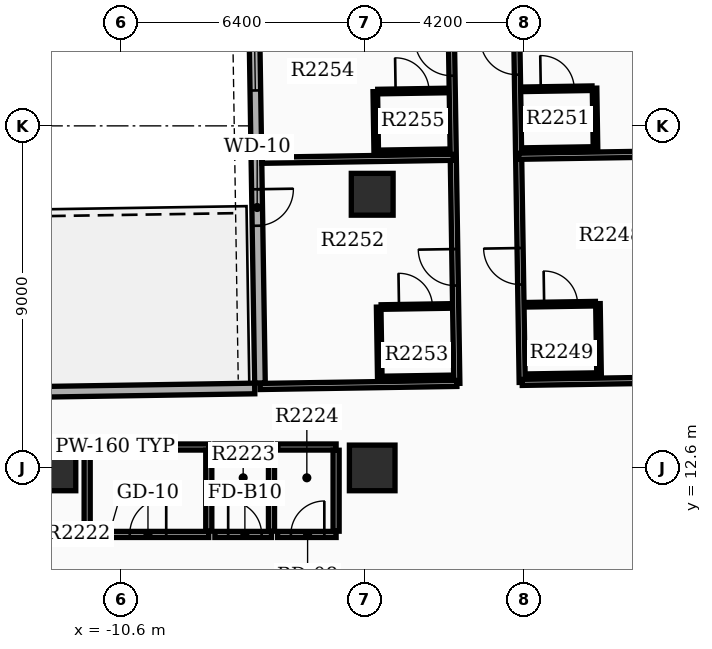
"""IFC4 building model, lengths in metres.
Left out: names, types, materials, properties, quantities, classifications, styles, units other than length and angle.
Written with IfcOpenShell. Run it as: python <this file> out.ifc"""

import sys

from ifc_helpers import new_model, si_unit, direction, frame, frame_2d, origin, origin_2d, place, context, subcontext, project, spatial, rectangle, extrude, element, fill, save


model = new_model("IFC4")
c1 = context("Model", 3, precision=1e-05, world=origin(), true_north=direction((0.0, 1.0)))
c2 = subcontext(c1, "Body", "Model", "MODEL_VIEW")
j1 = project(units=[si_unit("LENGTHUNIT", "METRE"), si_unit("PLANEANGLEUNIT", "RADIAN")], contexts=[c1])
p1 = place(None, origin())
s1 = spatial("IfcSite", under=j1, at=p1, CompositionType="ELEMENT")
p2 = place(p1, origin())
s2 = spatial("IfcBuilding", under=s1, at=p2, CompositionType="ELEMENT")
p3 = place(p2, frame((0.0, 0.0, 139.8)))
s3 = spatial("IfcBuildingStorey", under=s2, at=p3, CompositionType="ELEMENT", Elevation=139.8)
for number, where, z_axis, x_axis in (
    (1, (-12.4, 12.6, 0.0), (0.0, 0.0, 1.0), (1.0, 0.0, 0.0)),
    (2, (-4.0, 12.6, 0.0), (0.0, 0.0, 1.0), (1.0, 0.0, 0.0)),
):
    element("IfcColumn", number, at=place(p3, frame(where, z_axis=z_axis, x_axis=x_axis)), inside=s3, PredefinedType="COLUMN", context=c2, shape_type="SweptSolid", body=[
        extrude(rectangle(XDim=1.2, YDim=1.2, at=origin_2d()), origin(), (0.0, 0.0, 1.0), 3.9),
    ])
p4 = place(p3, frame((-4.0, 19.8, 0.0), z_axis=(0.0, 0.0, 1.0), x_axis=(1.0, 0.0, 0.0)))
e3 = element("IfcColumn", 3, at=p4, inside=s3, PredefinedType="COLUMN", context=c2, shape_type="SweptSolid", body=[
    extrude(rectangle(XDim=1.1, YDim=1.1, at=origin_2d()), origin(), (0.0, 0.0, 1.0), 3.9),
])
p5 = place(p3, frame((-7.27, 34.93, 0.0), z_axis=(0.0, 0.0, 1.0), x_axis=(0.015705059908, -0.999876667941, 0.0)))
e4 = element("IfcWall", 4, at=p5, inside=s3, PredefinedType="STANDARD", context=c2, shape_type="SweptSolid", body=[
    extrude(rectangle(XDim=20.1, YDim=0.28, at=frame_2d((10.05, 0.0))), origin(), (0.0, 0.0, 1.0), 2.92),
])
p6 = place(p5, frame((1.6, 0.0, 0.8)))
e5 = element("IfcOpeningElement", 5, at=p6, cuts=e4, PredefinedType="OPENING", context=c2, shape_type="SweptSolid", body=[
    extrude(rectangle(XDim=1.2, YDim=1.6, at=frame_2d((0.6, 0.8))), frame((0.0, 0.15, 0.0), z_axis=(0.0, -1.0, 0.0), x_axis=(1.0, 0.0, 0.0)), (0.0, 0.0, 1.0), 0.3),
])
p7 = place(p5, frame((4.8, 0.0, 0.8)))
e6 = element("IfcOpeningElement", 6, at=p7, cuts=e4, PredefinedType="OPENING", context=c2, shape_type="SweptSolid", body=[
    extrude(rectangle(XDim=1.2, YDim=1.6, at=frame_2d((0.6, 0.8))), frame((0.0, 0.15, 0.0), z_axis=(0.0, -1.0, 0.0), x_axis=(1.0, 0.0, 0.0)), (0.0, 0.0, 1.0), 0.3),
])
p8 = place(p5, frame((8.0, 0.0, 0.8)))
e7 = element("IfcOpeningElement", 7, at=p8, cuts=e4, PredefinedType="OPENING", context=c2, shape_type="SweptSolid", body=[
    extrude(rectangle(XDim=1.2, YDim=1.6, at=frame_2d((0.6, 0.8))), frame((0.0, 0.15, 0.0), z_axis=(0.0, -1.0, 0.0), x_axis=(1.0, 0.0, 0.0)), (0.0, 0.0, 1.0), 0.3),
])
p9 = place(p5, frame((11.2, 0.0, 0.8)))
e8 = element("IfcOpeningElement", 8, at=p9, cuts=e4, PredefinedType="OPENING", context=c2, shape_type="SweptSolid", body=[
    extrude(rectangle(XDim=1.2, YDim=1.6, at=frame_2d((0.6, 0.8))), frame((0.0, 0.15, 0.0), z_axis=(0.0, -1.0, 0.0), x_axis=(1.0, 0.0, 0.0)), (0.0, 0.0, 1.0), 0.3),
])
p10 = place(p5, frame((15.0, 0.0, 0.0)))
e9 = element("IfcOpeningElement", 9, at=p10, cuts=e4, PredefinedType="OPENING", context=c2, shape_type="SweptSolid", body=[
    extrude(rectangle(XDim=0.96, YDim=2.1, at=frame_2d((0.48, 1.05))), frame((0.0, 0.15, 0.0), z_axis=(0.0, -1.0, 0.0), x_axis=(1.0, 0.0, 0.0)), (0.0, 0.0, 1.0), 0.3),
])
p11 = place(p3, frame((-13.391, 14.592, 0.0), z_axis=(0.0, 0.0, 1.0), x_axis=(0.999876833368, 0.015694524359, 0.0)))
e10 = element("IfcWall", 10, at=p11, inside=s3, PredefinedType="STANDARD", context=c2, shape_type="SweptSolid", body=[
    extrude(rectangle(XDim=6.3, YDim=0.28, at=frame_2d((3.15, 0.0))), origin(), (0.0, 0.0, 1.0), 2.92),
])
p12 = place(p3, frame((-11.5, 10.85, 0.0), z_axis=(0.0, 0.0, 1.0), x_axis=(1.0, 0.0, 0.0)))
e11 = element("IfcWall", 11, at=p12, inside=s3, PredefinedType="PARTITIONING", context=c2, shape_type="SweptSolid", body=[
    extrude(rectangle(XDim=3.2, YDim=0.16, at=frame_2d((1.6, 0.0))), origin(), (0.0, 0.0, 1.0), 2.91),
])
p13 = place(p12, frame((1.12, 0.0, 0.0)))
e12 = element("IfcOpeningElement", 12, at=p13, cuts=e11, PredefinedType="OPENING", context=c2, shape_type="SweptSolid", body=[
    extrude(rectangle(XDim=0.96, YDim=2.15, at=frame_2d((0.48, 1.075))), frame((0.0, 0.09, 0.0), z_axis=(0.0, -1.0, 0.0), x_axis=(1.0, 0.0, 0.0)), (0.0, 0.0, 1.0), 0.18),
])
p14 = place(p3, frame((-11.5, 13.15, 0.0), z_axis=(0.0, 0.0, 1.0), x_axis=(1.0, 0.0, 0.0)))
e13 = element("IfcWall", 13, at=p14, inside=s3, PredefinedType="PARTITIONING", context=c2, shape_type="SweptSolid", body=[
    extrude(rectangle(XDim=3.2, YDim=0.16, at=frame_2d((1.6, 0.0))), origin(), (0.0, 0.0, 1.0), 2.91),
])
for number, where, z_axis, x_axis in (
    (14, (-11.5, 10.935, 0.0), (0.0, 0.0, 1.0), (0.0, 1.0, 0.0)),
    (15, (-8.3, 10.935, 0.0), (0.0, 0.0, 1.0), (0.0, 1.0, 0.0)),
):
    element("IfcWall", number, at=place(p3, frame(where, z_axis=z_axis, x_axis=x_axis)), inside=s3, PredefinedType="PARTITIONING", context=c2, shape_type="SweptSolid", body=[
        extrude(rectangle(XDim=2.13, YDim=0.16, at=frame_2d((1.065, 0.0))), origin(), (0.0, 0.0, 1.0), 2.91),
    ])
p15 = place(p3, frame((-8.14, 10.85, 0.0), z_axis=(0.0, 0.0, 1.0), x_axis=(1.0, 0.0, 0.0)))
e16 = element("IfcWall", 16, at=p15, inside=s3, PredefinedType="PARTITIONING", context=c2, shape_type="SweptSolid", body=[
    extrude(rectangle(XDim=1.49, YDim=0.16, at=frame_2d((0.745, 0.0))), origin(), (0.0, 0.0, 1.0), 2.91),
])
p16 = place(p15, frame((0.35, 0.0, 0.0)))
e17 = element("IfcOpeningElement", 17, at=p16, cuts=e16, PredefinedType="OPENING", context=c2, shape_type="SweptSolid", body=[
    extrude(rectangle(XDim=0.88, YDim=2.1, at=frame_2d((0.44, 1.05))), frame((0.0, 0.09, 0.0), z_axis=(0.0, -1.0, 0.0), x_axis=(1.0, 0.0, 0.0)), (0.0, 0.0, 1.0), 0.18),
])
p17 = place(p3, frame((-8.14, 13.15, 0.0), z_axis=(0.0, 0.0, 1.0), x_axis=(1.0, 0.0, 0.0)))
e18 = element("IfcWall", 18, at=p17, inside=s3, PredefinedType="PARTITIONING", context=c2, shape_type="SweptSolid", body=[
    extrude(rectangle(XDim=1.49, YDim=0.16, at=frame_2d((0.745, 0.0))), origin(), (0.0, 0.0, 1.0), 2.91),
])
p18 = place(p3, frame((-6.65, 10.935, 0.0), z_axis=(0.0, 0.0, 1.0), x_axis=(0.0, 1.0, 0.0)))
e19 = element("IfcWall", 19, at=p18, inside=s3, PredefinedType="PARTITIONING", context=c2, shape_type="SweptSolid", body=[
    extrude(rectangle(XDim=2.13, YDim=0.16, at=frame_2d((1.065, 0.0))), origin(), (0.0, 0.0, 1.0), 2.91),
])
p19 = place(p3, frame((-6.49, 10.85, 0.0), z_axis=(0.0, 0.0, 1.0), x_axis=(1.0, 0.0, 0.0)))
e20 = element("IfcWall", 20, at=p19, inside=s3, PredefinedType="PARTITIONING", context=c2, shape_type="SweptSolid", body=[
    extrude(rectangle(XDim=1.54, YDim=0.16, at=frame_2d((0.77, 0.0))), origin(), (0.0, 0.0, 1.0), 2.91),
])
p20 = place(p19, frame((0.35, 0.0, 0.0)))
e21 = element("IfcOpeningElement", 21, at=p20, cuts=e20, PredefinedType="OPENING", context=c2, shape_type="SweptSolid", body=[
    extrude(rectangle(XDim=0.88, YDim=2.15, at=frame_2d((0.44, 1.075))), frame((0.0, 0.09, 0.0), z_axis=(0.0, -1.0, 0.0), x_axis=(1.0, 0.0, 0.0)), (0.0, 0.0, 1.0), 0.18),
])
p21 = place(p3, frame((-6.49, 13.15, 0.0), z_axis=(0.0, 0.0, 1.0), x_axis=(1.0, 0.0, 0.0)))
e22 = element("IfcWall", 22, at=p21, inside=s3, PredefinedType="PARTITIONING", context=c2, shape_type="SweptSolid", body=[
    extrude(rectangle(XDim=1.54, YDim=0.16, at=frame_2d((0.77, 0.0))), origin(), (0.0, 0.0, 1.0), 2.91),
])
p22 = place(p3, frame((-4.95, 10.935, 0.0), z_axis=(0.0, 0.0, 1.0), x_axis=(0.0, 1.0, 0.0)))
e23 = element("IfcWall", 23, at=p22, inside=s3, PredefinedType="PARTITIONING", context=c2, shape_type="SweptSolid", body=[
    extrude(rectangle(XDim=2.13, YDim=0.16, at=frame_2d((1.065, 0.0))), origin(), (0.0, 0.0, 1.0), 2.91),
])
p23 = place(p3, frame((-0.053, 14.851, 0.0), z_axis=(0.0, 0.0, 1.0), x_axis=(-0.015705659641, 0.999876658521, 0.0)))
e24 = element("IfcWall", 24, at=p23, inside=s3, PredefinedType="PARTITIONING", context=c2, shape_type="SweptSolid", body=[
    extrude(rectangle(XDim=9.7, YDim=0.16, at=frame_2d((4.85, 0.0))), origin(), (0.0, 0.0, 1.0), 2.91),
])
p24 = place(p23, frame((2.575, 0.0, 0.0)))
e25 = element("IfcOpeningElement", 25, at=p24, cuts=e24, PredefinedType="OPENING", context=c2, shape_type="SweptSolid", body=[
    extrude(rectangle(XDim=0.96, YDim=2.15, at=frame_2d((0.48, 1.075))), frame((0.0, 0.09, 0.0), z_axis=(0.0, -1.0, 0.0), x_axis=(1.0, 0.0, 0.0)), (0.0, 0.0, 1.0), 0.18),
])
p25 = place(p23, frame((8.097, 0.0, 0.0)))
e26 = element("IfcOpeningElement", 26, at=p25, cuts=e24, PredefinedType="OPENING", context=c2, shape_type="SweptSolid", body=[
    extrude(rectangle(XDim=0.96, YDim=2.15, at=frame_2d((0.48, 1.075))), frame((0.0, 0.09, 0.0), z_axis=(0.0, -1.0, 0.0), x_axis=(1.0, 0.0, 0.0)), (0.0, 0.0, 1.0), 0.18),
])
p26 = place(p3, frame((-0.053, 14.851, 0.0), z_axis=(0.0, 0.0, 1.0), x_axis=(0.999877075733, 0.015679076008, 0.0)))
e27 = element("IfcWall", 27, at=p26, inside=s3, PredefinedType="PARTITIONING", context=c2, shape_type="SweptSolid", body=[
    extrude(rectangle(XDim=6.54, YDim=0.16, at=frame_2d((3.27, 0.0))), origin(), (0.0, 0.0, 1.0), 2.91),
])
p27 = place(p3, frame((-0.147, 20.8, 0.0), z_axis=(0.0, 0.0, 1.0), x_axis=(0.999876774542, 0.015698271615, 0.0)))
e28 = element("IfcWall", 28, at=p27, inside=s3, PredefinedType="PARTITIONING", context=c2, shape_type="SweptSolid", body=[
    extrude(rectangle(XDim=6.392, YDim=0.16, at=frame_2d((3.196, 0.0))), origin(), (0.0, 0.0, 1.0), 2.91),
])
p28 = place(p3, frame((0.055, 16.893, 0.0), z_axis=(0.0, 0.0, 1.0), x_axis=(0.999876836305, 0.015694337248, 0.0)))
e29 = element("IfcWall", 29, at=p28, inside=s3, PredefinedType="PARTITIONING", context=c2, shape_type="SweptSolid", body=[
    extrude(rectangle(XDim=1.82, YDim=0.12, at=frame_2d((0.91, 0.0))), origin(), (0.0, 0.0, 1.0), 2.91),
])
p29 = place(p28, frame((0.47, 0.0, 0.0)))
e30 = element("IfcOpeningElement", 30, at=p29, cuts=e29, PredefinedType="OPENING", context=c2, shape_type="SweptSolid", body=[
    extrude(rectangle(XDim=0.88, YDim=2.1, at=frame_2d((0.44, 1.05))), frame((0.0, 0.07, 0.0), z_axis=(0.0, -1.0, 0.0), x_axis=(1.0, 0.0, 0.0)), (0.0, 0.0, 1.0), 0.14),
])
p30 = place(p3, frame((0.084, 15.013, 0.0), z_axis=(0.0, 0.0, 1.0), x_axis=(0.999876836305, 0.015694337248, 0.0)))
e31 = element("IfcWall", 31, at=p30, inside=s3, PredefinedType="PARTITIONING", context=c2, shape_type="SweptSolid", body=[
    extrude(rectangle(XDim=1.82, YDim=0.12, at=frame_2d((0.91, 0.0))), origin(), (0.0, 0.0, 1.0), 2.91),
])
p31 = place(p3, frame((1.969, 15.043, 0.0), z_axis=(0.0, 0.0, 1.0), x_axis=(-0.01571234584, 0.999876553475, 0.0)))
e32 = element("IfcWall", 32, at=p31, inside=s3, PredefinedType="PARTITIONING", context=c2, shape_type="SweptSolid", body=[
    extrude(rectangle(XDim=1.88, YDim=0.12, at=frame_2d((0.94, 0.0))), origin(), (0.0, 0.0, 1.0), 2.91),
])
p32 = place(p3, frame((-0.034, 22.562, 0.0), z_axis=(0.0, 0.0, 1.0), x_axis=(0.999876836305, 0.015694337248, 0.0)))
e33 = element("IfcWall", 33, at=p32, inside=s3, PredefinedType="PARTITIONING", context=c2, shape_type="SweptSolid", body=[
    extrude(rectangle(XDim=1.82, YDim=0.12, at=frame_2d((0.91, 0.0))), origin(), (0.0, 0.0, 1.0), 2.91),
])
p33 = place(p32, frame((0.47, 0.0, 0.0)))
e34 = element("IfcOpeningElement", 34, at=p33, cuts=e33, PredefinedType="OPENING", context=c2, shape_type="SweptSolid", body=[
    extrude(rectangle(XDim=0.88, YDim=2.1, at=frame_2d((0.44, 1.05))), frame((0.0, 0.07, 0.0), z_axis=(0.0, -1.0, 0.0), x_axis=(1.0, 0.0, 0.0)), (0.0, 0.0, 1.0), 0.14),
])
p34 = place(p3, frame((-0.009, 20.962, 0.0), z_axis=(0.0, 0.0, 1.0), x_axis=(0.999876836305, 0.015694337248, 0.0)))
e35 = element("IfcWall", 35, at=p34, inside=s3, PredefinedType="PARTITIONING", context=c2, shape_type="SweptSolid", body=[
    extrude(rectangle(XDim=1.82, YDim=0.12, at=frame_2d((0.91, 0.0))), origin(), (0.0, 0.0, 1.0), 2.91),
])
p35 = place(p3, frame((1.875, 20.992, 0.0), z_axis=(0.0, 0.0, 1.0), x_axis=(-0.015716050513, 0.999876495251, 0.0)))
e36 = element("IfcWall", 36, at=p35, inside=s3, PredefinedType="PARTITIONING", context=c2, shape_type="SweptSolid", body=[
    extrude(rectangle(XDim=1.6, YDim=0.12, at=frame_2d((0.8, 0.0))), origin(), (0.0, 0.0, 1.0), 2.91),
])
p36 = place(p3, frame((-1.773, 14.824, 0.0), z_axis=(0.0, 0.0, 1.0), x_axis=(-0.015680496509, 0.999877053457, 0.0)))
e37 = element("IfcWall", 37, at=p36, inside=s3, PredefinedType="PARTITIONING", context=c2, shape_type="SweptSolid", body=[
    extrude(rectangle(XDim=9.7, YDim=0.16, at=frame_2d((4.85, 0.0))), origin(), (0.0, 0.0, 1.0), 2.91),
])
p37 = place(p36, frame((2.575, 0.0, 0.0)))
e38 = element("IfcOpeningElement", 38, at=p37, cuts=e37, PredefinedType="OPENING", context=c2, shape_type="SweptSolid", body=[
    extrude(rectangle(XDim=0.96, YDim=2.15, at=frame_2d((0.48, 1.075))), frame((0.0, 0.09, 0.0), z_axis=(0.0, -1.0, 0.0), x_axis=(1.0, 0.0, 0.0)), (0.0, 0.0, 1.0), 0.18),
])
p38 = place(p36, frame((8.097, 0.0, 0.0)))
e39 = element("IfcOpeningElement", 39, at=p38, cuts=e37, PredefinedType="OPENING", context=c2, shape_type="SweptSolid", body=[
    extrude(rectangle(XDim=0.96, YDim=2.15, at=frame_2d((0.48, 1.075))), frame((0.0, 0.09, 0.0), z_axis=(0.0, -1.0, 0.0), x_axis=(1.0, 0.0, 0.0)), (0.0, 0.0, 1.0), 0.18),
])
p39 = place(p3, frame((-1.773, 14.824, 0.0), z_axis=(0.0, 0.0, 1.0), x_axis=(-0.999876822016, -0.01569524756, 0.0)))
e40 = element("IfcWall", 40, at=p39, inside=s3, PredefinedType="PARTITIONING", context=c2, shape_type="SweptSolid", body=[
    extrude(rectangle(XDim=5.18, YDim=0.16, at=frame_2d((2.59, 0.0))), origin(), (0.0, 0.0, 1.0), 2.91),
])
p40 = place(p3, frame((-1.866, 20.773, 0.0), z_axis=(0.0, 0.0, 1.0), x_axis=(-0.999876443474, -0.015719344349, 0.0)))
e41 = element("IfcWall", 41, at=p40, inside=s3, PredefinedType="PARTITIONING", context=c2, shape_type="SweptSolid", body=[
    extrude(rectangle(XDim=5.032, YDim=0.16, at=frame_2d((2.516, 0.0))), origin(), (0.0, 0.0, 1.0), 2.91),
])
p41 = place(p3, frame((-3.765, 16.833, 0.0), z_axis=(0.0, 0.0, 1.0), x_axis=(0.999876836305, 0.015694337248, 0.0)))
e42 = element("IfcWall", 42, at=p41, inside=s3, PredefinedType="PARTITIONING", context=c2, shape_type="SweptSolid", body=[
    extrude(rectangle(XDim=1.82, YDim=0.12, at=frame_2d((0.91, 0.0))), origin(), (0.0, 0.0, 1.0), 2.91),
])
p42 = place(p41, frame((0.47, 0.0, 0.0)))
e43 = element("IfcOpeningElement", 43, at=p42, cuts=e42, PredefinedType="OPENING", context=c2, shape_type="SweptSolid", body=[
    extrude(rectangle(XDim=0.88, YDim=2.1, at=frame_2d((0.44, 1.05))), frame((0.0, 0.07, 0.0), z_axis=(0.0, -1.0, 0.0), x_axis=(1.0, 0.0, 0.0)), (0.0, 0.0, 1.0), 0.14),
])
p43 = place(p3, frame((-3.735, 14.953, 0.0), z_axis=(0.0, 0.0, 1.0), x_axis=(0.999876836305, 0.015694337248, 0.0)))
e44 = element("IfcWall", 44, at=p43, inside=s3, PredefinedType="PARTITIONING", context=c2, shape_type="SweptSolid", body=[
    extrude(rectangle(XDim=1.82, YDim=0.12, at=frame_2d((0.91, 0.0))), origin(), (0.0, 0.0, 1.0), 2.91),
])
p44 = place(p3, frame((-3.8, 14.952, 0.0), z_axis=(0.0, 0.0, 1.0), x_axis=(-0.015714386166, 0.99987652141, 0.0)))
e45 = element("IfcWall", 45, at=p44, inside=s3, PredefinedType="PARTITIONING", context=c2, shape_type="SweptSolid", body=[
    extrude(rectangle(XDim=1.88, YDim=0.12, at=frame_2d((0.94, 0.0))), origin(), (0.0, 0.0, 1.0), 2.91),
])
p45 = place(p3, frame((-3.854, 22.502, 0.0), z_axis=(0.0, 0.0, 1.0), x_axis=(0.999876836305, 0.015694337248, 0.0)))
e46 = element("IfcWall", 46, at=p45, inside=s3, PredefinedType="PARTITIONING", context=c2, shape_type="SweptSolid", body=[
    extrude(rectangle(XDim=1.82, YDim=0.12, at=frame_2d((0.91, 0.0))), origin(), (0.0, 0.0, 1.0), 2.91),
])
p46 = place(p45, frame((0.47, 0.0, 0.0)))
e47 = element("IfcOpeningElement", 47, at=p46, cuts=e46, PredefinedType="OPENING", context=c2, shape_type="SweptSolid", body=[
    extrude(rectangle(XDim=0.88, YDim=2.1, at=frame_2d((0.44, 1.05))), frame((0.0, 0.07, 0.0), z_axis=(0.0, -1.0, 0.0), x_axis=(1.0, 0.0, 0.0)), (0.0, 0.0, 1.0), 0.14),
])
p47 = place(p3, frame((-3.829, 20.902, 0.0), z_axis=(0.0, 0.0, 1.0), x_axis=(0.999876836305, 0.015694337248, 0.0)))
e48 = element("IfcWall", 48, at=p47, inside=s3, PredefinedType="PARTITIONING", context=c2, shape_type="SweptSolid", body=[
    extrude(rectangle(XDim=1.82, YDim=0.12, at=frame_2d((0.91, 0.0))), origin(), (0.0, 0.0, 1.0), 2.91),
])
p48 = place(p3, frame((-3.894, 20.901, 0.0), z_axis=(0.0, 0.0, 1.0), x_axis=(-0.015716050513, 0.999876495251, 0.0)))
e49 = element("IfcWall", 49, at=p48, inside=s3, PredefinedType="PARTITIONING", context=c2, shape_type="SweptSolid", body=[
    extrude(rectangle(XDim=1.6, YDim=0.12, at=frame_2d((0.8, 0.0))), origin(), (0.0, 0.0, 1.0), 2.91),
])
p49 = place(p9, origin())
e50 = element("IfcWindow", 50, at=p49, inside=s3, PartitioningType="SINGLE_PANEL", PredefinedType="WINDOW", context=c2, shape_type="SweptSolid", body=[
    extrude(rectangle(XDim=1.2, YDim=1.6, at=frame_2d((0.6, 0.8))), frame((0.0, 0.03, 0.0), z_axis=(0.0, -1.0, 0.0), x_axis=(1.0, 0.0, 0.0)), (0.0, 0.0, 1.0), 0.06),
])
fill(e8, e50)
p50 = place(p10, origin())
e51 = element("IfcDoor", 51, at=p50, inside=s3, OperationType="SINGLE_SWING_LEFT", PredefinedType="DOOR", context=c2, shape_type="SweptSolid", body=[
    extrude(rectangle(XDim=0.96, YDim=2.1, at=frame_2d((0.48, 1.05))), frame((0.0, 0.025, 0.0), z_axis=(0.0, -1.0, 0.0), x_axis=(1.0, 0.0, 0.0)), (0.0, 0.0, 1.0), 0.05),
])
fill(e9, e51)
p51 = place(p13, origin())
e52 = element("IfcDoor", 52, at=p51, inside=s3, OperationType="SINGLE_SWING_RIGHT", PredefinedType="DOOR", context=c2, shape_type="SweptSolid", body=[
    extrude(rectangle(XDim=0.96, YDim=2.15, at=frame_2d((0.48, 1.075))), frame((0.0, 0.025, 0.0), z_axis=(0.0, -1.0, 0.0), x_axis=(1.0, 0.0, 0.0)), (0.0, 0.0, 1.0), 0.05),
])
fill(e12, e52)
p52 = place(p16, origin())
e53 = element("IfcDoor", 53, at=p52, inside=s3, OperationType="SINGLE_SWING_LEFT", PredefinedType="DOOR", context=c2, shape_type="SweptSolid", body=[
    extrude(rectangle(XDim=0.88, YDim=2.1, at=frame_2d((0.44, 1.05))), frame((0.0, 0.025, 0.0), z_axis=(0.0, -1.0, 0.0), x_axis=(1.0, 0.0, 0.0)), (0.0, 0.0, 1.0), 0.05),
])
fill(e17, e53)
p53 = place(p20, origin())
e54 = element("IfcDoor", 54, at=p53, inside=s3, OperationType="SINGLE_SWING_RIGHT", PredefinedType="DOOR", context=c2, shape_type="SweptSolid", body=[
    extrude(rectangle(XDim=0.88, YDim=2.15, at=frame_2d((0.44, 1.075))), frame((0.0, 0.025, 0.0), z_axis=(0.0, -1.0, 0.0), x_axis=(1.0, 0.0, 0.0)), (0.0, 0.0, 1.0), 0.05),
])
fill(e21, e54)
p54 = place(p24, origin())
e55 = element("IfcDoor", 55, at=p54, inside=s3, OperationType="SINGLE_SWING_RIGHT", PredefinedType="DOOR", context=c2, shape_type="SweptSolid", body=[
    extrude(rectangle(XDim=0.96, YDim=2.15, at=frame_2d((0.48, 1.075))), frame((0.0, 0.025, 0.0), z_axis=(0.0, -1.0, 0.0), x_axis=(1.0, 0.0, 0.0)), (0.0, 0.0, 1.0), 0.05),
])
fill(e25, e55)
p55 = place(p29, origin())
e56 = element("IfcDoor", 56, at=p55, inside=s3, OperationType="SINGLE_SWING_LEFT", PredefinedType="DOOR", context=c2, shape_type="SweptSolid", body=[
    extrude(rectangle(XDim=0.88, YDim=2.1, at=frame_2d((0.44, 1.05))), frame((0.0, 0.025, 0.0), z_axis=(0.0, -1.0, 0.0), x_axis=(1.0, 0.0, 0.0)), (0.0, 0.0, 1.0), 0.05),
])
fill(e30, e56)
p56 = place(p25, origin())
e57 = element("IfcDoor", 57, at=p56, inside=s3, OperationType="SINGLE_SWING_RIGHT", PredefinedType="DOOR", context=c2, shape_type="SweptSolid", body=[
    extrude(rectangle(XDim=0.96, YDim=2.15, at=frame_2d((0.48, 1.075))), frame((0.0, 0.025, 0.0), z_axis=(0.0, -1.0, 0.0), x_axis=(1.0, 0.0, 0.0)), (0.0, 0.0, 1.0), 0.05),
])
fill(e26, e57)
p57 = place(p33, origin())
e58 = element("IfcDoor", 58, at=p57, inside=s3, OperationType="SINGLE_SWING_LEFT", PredefinedType="DOOR", context=c2, shape_type="SweptSolid", body=[
    extrude(rectangle(XDim=0.88, YDim=2.1, at=frame_2d((0.44, 1.05))), frame((0.0, 0.025, 0.0), z_axis=(0.0, -1.0, 0.0), x_axis=(1.0, 0.0, 0.0)), (0.0, 0.0, 1.0), 0.05),
])
fill(e34, e58)
p58 = place(p37, origin())
e59 = element("IfcDoor", 59, at=p58, inside=s3, OperationType="SINGLE_SWING_RIGHT", PredefinedType="DOOR", context=c2, shape_type="SweptSolid", body=[
    extrude(rectangle(XDim=0.96, YDim=2.15, at=frame_2d((0.48, 1.075))), frame((0.0, 0.025, 0.0), z_axis=(0.0, -1.0, 0.0), x_axis=(1.0, 0.0, 0.0)), (0.0, 0.0, 1.0), 0.05),
])
fill(e38, e59)
p59 = place(p42, origin())
e60 = element("IfcDoor", 60, at=p59, inside=s3, OperationType="SINGLE_SWING_LEFT", PredefinedType="DOOR", context=c2, shape_type="SweptSolid", body=[
    extrude(rectangle(XDim=0.88, YDim=2.1, at=frame_2d((0.44, 1.05))), frame((0.0, 0.025, 0.0), z_axis=(0.0, -1.0, 0.0), x_axis=(1.0, 0.0, 0.0)), (0.0, 0.0, 1.0), 0.05),
])
fill(e43, e60)
p60 = place(p38, origin())
e61 = element("IfcDoor", 61, at=p60, inside=s3, OperationType="SINGLE_SWING_RIGHT", PredefinedType="DOOR", context=c2, shape_type="SweptSolid", body=[
    extrude(rectangle(XDim=0.96, YDim=2.15, at=frame_2d((0.48, 1.075))), frame((0.0, 0.025, 0.0), z_axis=(0.0, -1.0, 0.0), x_axis=(1.0, 0.0, 0.0)), (0.0, 0.0, 1.0), 0.05),
])
fill(e39, e61)
p61 = place(p46, origin())
e62 = element("IfcDoor", 62, at=p61, inside=s3, OperationType="SINGLE_SWING_LEFT", PredefinedType="DOOR", context=c2, shape_type="SweptSolid", body=[
    extrude(rectangle(XDim=0.88, YDim=2.1, at=frame_2d((0.44, 1.05))), frame((0.0, 0.025, 0.0), z_axis=(0.0, -1.0, 0.0), x_axis=(1.0, 0.0, 0.0)), (0.0, 0.0, 1.0), 0.05),
])
fill(e47, e62)
save(model, sys.argv[1])
